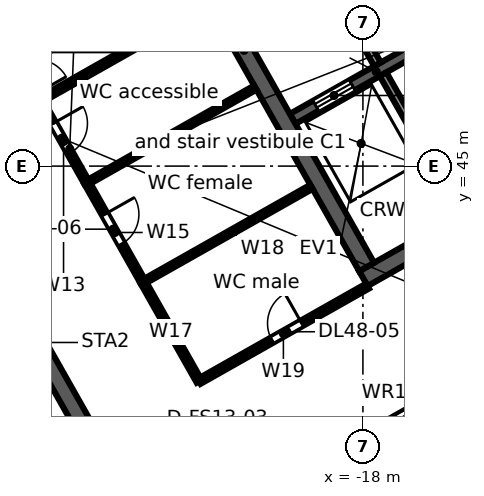
"""IFC4 building model, lengths in metres.
Left out: names, types, materials, properties, quantities, classifications, styles, units other than length and angle.
Written with IfcOpenShell. Run it as: python <this file> out.ifc"""

import sys

from ifc_helpers import new_model, si_unit, direction, frame, frame_2d, origin, place, context, subcontext, project, spatial, rectangle, extrude, element, fill, save


model = new_model("IFC4")
c1 = context("Model", 3, precision=1e-05, world=origin(), true_north=direction((0.0, 1.0)))
c2 = subcontext(c1, "Body", "Model", "MODEL_VIEW")
j1 = project(units=[si_unit("LENGTHUNIT", "METRE"), si_unit("PLANEANGLEUNIT", "RADIAN")], contexts=[c1])
p1 = place(None, origin())
s1 = spatial("IfcSite", under=j1, at=p1, CompositionType="ELEMENT")
p2 = place(p1, origin())
s2 = spatial("IfcBuilding", under=s1, at=p2, CompositionType="ELEMENT")
p3 = place(p2, frame((0.0, 0.0, 227.0)))
s3 = spatial("IfcBuildingStorey", under=s2, at=p3, CompositionType="ELEMENT", Elevation=227.0)
p4 = place(p3, frame((-0.046, 47.974, 0.0), z_axis=(0.0, 0.0, 1.0), x_axis=(-0.870356579543, -0.492421998337, 0.0)))
e1 = element("IfcWall", 1, at=p4, inside=s3, PredefinedType="STANDARD", context=c2, shape_type="SweptSolid", body=[
    extrude(rectangle(XDim=43.754, YDim=0.25, at=frame_2d((21.877, 0.0))), origin(), (0.0, 0.0, 1.0), 3.55),
])
p5 = place(p4, frame((41.061, 0.0, 0.8)))
e2 = element("IfcOpeningElement", 2, at=p5, cuts=e1, PredefinedType="OPENING", context=c2, shape_type="SweptSolid", body=[
    extrude(rectangle(XDim=2.4, YDim=2.2, at=frame_2d((1.2, 1.1))), frame((0.0, 0.135, 0.0), z_axis=(0.0, -1.0, 0.0), x_axis=(1.0, 0.0, 0.0)), (0.0, 0.0, 1.0), 0.27),
])
p6 = place(p4, frame((38.443, 0.0, 0.0)))
e3 = element("IfcOpeningElement", 3, at=p6, cuts=e1, PredefinedType="OPENING", context=c2, shape_type="SweptSolid", body=[
    extrude(rectangle(XDim=1.8, YDim=2.4, at=frame_2d((0.9, 1.2))), frame((0.0, 0.135, 0.0), z_axis=(0.0, -1.0, 0.0), x_axis=(1.0, 0.0, 0.0)), (0.0, 0.0, 1.0), 0.27),
])
p7 = place(p4, frame((35.225, 0.0, 0.8)))
e4 = element("IfcOpeningElement", 4, at=p7, cuts=e1, PredefinedType="OPENING", context=c2, shape_type="SweptSolid", body=[
    extrude(rectangle(XDim=2.4, YDim=2.2, at=frame_2d((1.2, 1.1))), frame((0.0, 0.135, 0.0), z_axis=(0.0, -1.0, 0.0), x_axis=(1.0, 0.0, 0.0)), (0.0, 0.0, 1.0), 0.27),
])
p8 = place(p4, frame((32.307, 0.0, 0.8)))
e5 = element("IfcOpeningElement", 5, at=p8, cuts=e1, PredefinedType="OPENING", context=c2, shape_type="SweptSolid", body=[
    extrude(rectangle(XDim=2.4, YDim=2.2, at=frame_2d((1.2, 1.1))), frame((0.0, 0.135, 0.0), z_axis=(0.0, -1.0, 0.0), x_axis=(1.0, 0.0, 0.0)), (0.0, 0.0, 1.0), 0.27),
])
p9 = place(p4, frame((29.688, 0.0, 0.0)))
e6 = element("IfcOpeningElement", 6, at=p9, cuts=e1, PredefinedType="OPENING", context=c2, shape_type="SweptSolid", body=[
    extrude(rectangle(XDim=1.8, YDim=2.4, at=frame_2d((0.9, 1.2))), frame((0.0, 0.135, 0.0), z_axis=(0.0, -1.0, 0.0), x_axis=(1.0, 0.0, 0.0)), (0.0, 0.0, 1.0), 0.27),
])
p10 = place(p4, frame((26.47, 0.0, 0.8)))
e7 = element("IfcOpeningElement", 7, at=p10, cuts=e1, PredefinedType="OPENING", context=c2, shape_type="SweptSolid", body=[
    extrude(rectangle(XDim=2.4, YDim=2.2, at=frame_2d((1.2, 1.1))), frame((0.0, 0.135, 0.0), z_axis=(0.0, -1.0, 0.0), x_axis=(1.0, 0.0, 0.0)), (0.0, 0.0, 1.0), 0.27),
])
p11 = place(p4, frame((23.552, 0.0, 0.8)))
e8 = element("IfcOpeningElement", 8, at=p11, cuts=e1, PredefinedType="OPENING", context=c2, shape_type="SweptSolid", body=[
    extrude(rectangle(XDim=2.4, YDim=2.2, at=frame_2d((1.2, 1.1))), frame((0.0, 0.135, 0.0), z_axis=(0.0, -1.0, 0.0), x_axis=(1.0, 0.0, 0.0)), (0.0, 0.0, 1.0), 0.27),
])
p12 = place(p4, frame((20.934, 0.0, 0.0)))
e9 = element("IfcOpeningElement", 9, at=p12, cuts=e1, PredefinedType="OPENING", context=c2, shape_type="SweptSolid", body=[
    extrude(rectangle(XDim=1.8, YDim=2.4, at=frame_2d((0.9, 1.2))), frame((0.0, 0.135, 0.0), z_axis=(0.0, -1.0, 0.0), x_axis=(1.0, 0.0, 0.0)), (0.0, 0.0, 1.0), 0.27),
])
p13 = place(p4, frame((17.716, 0.0, 0.8)))
e10 = element("IfcOpeningElement", 10, at=p13, cuts=e1, PredefinedType="OPENING", context=c2, shape_type="SweptSolid", body=[
    extrude(rectangle(XDim=2.4, YDim=2.2, at=frame_2d((1.2, 1.1))), frame((0.0, 0.135, 0.0), z_axis=(0.0, -1.0, 0.0), x_axis=(1.0, 0.0, 0.0)), (0.0, 0.0, 1.0), 0.27),
])
p14 = place(p4, frame((14.798, 0.0, 0.8)))
e11 = element("IfcOpeningElement", 11, at=p14, cuts=e1, PredefinedType="OPENING", context=c2, shape_type="SweptSolid", body=[
    extrude(rectangle(XDim=2.4, YDim=2.2, at=frame_2d((1.2, 1.1))), frame((0.0, 0.135, 0.0), z_axis=(0.0, -1.0, 0.0), x_axis=(1.0, 0.0, 0.0)), (0.0, 0.0, 1.0), 0.27),
])
p15 = place(p4, frame((12.179, 0.0, 0.0)))
e12 = element("IfcOpeningElement", 12, at=p15, cuts=e1, PredefinedType="OPENING", context=c2, shape_type="SweptSolid", body=[
    extrude(rectangle(XDim=1.8, YDim=2.4, at=frame_2d((0.9, 1.2))), frame((0.0, 0.135, 0.0), z_axis=(0.0, -1.0, 0.0), x_axis=(1.0, 0.0, 0.0)), (0.0, 0.0, 1.0), 0.27),
])
p16 = place(p4, frame((8.961, 0.0, 0.8)))
e13 = element("IfcOpeningElement", 13, at=p16, cuts=e1, PredefinedType="OPENING", context=c2, shape_type="SweptSolid", body=[
    extrude(rectangle(XDim=2.4, YDim=2.2, at=frame_2d((1.2, 1.1))), frame((0.0, 0.135, 0.0), z_axis=(0.0, -1.0, 0.0), x_axis=(1.0, 0.0, 0.0)), (0.0, 0.0, 1.0), 0.27),
])
p17 = place(p4, frame((6.043, 0.0, 0.8)))
e14 = element("IfcOpeningElement", 14, at=p17, cuts=e1, PredefinedType="OPENING", context=c2, shape_type="SweptSolid", body=[
    extrude(rectangle(XDim=2.4, YDim=2.2, at=frame_2d((1.2, 1.1))), frame((0.0, 0.135, 0.0), z_axis=(0.0, -1.0, 0.0), x_axis=(1.0, 0.0, 0.0)), (0.0, 0.0, 1.0), 0.27),
])
p18 = place(p4, frame((3.425, 0.0, 0.0)))
e15 = element("IfcOpeningElement", 15, at=p18, cuts=e1, PredefinedType="OPENING", context=c2, shape_type="SweptSolid", body=[
    extrude(rectangle(XDim=1.8, YDim=2.4, at=frame_2d((0.9, 1.2))), frame((0.0, 0.135, 0.0), z_axis=(0.0, -1.0, 0.0), x_axis=(1.0, 0.0, 0.0)), (0.0, 0.0, 1.0), 0.27),
])
p19 = place(p4, frame((0.207, 0.0, 0.8)))
e16 = element("IfcOpeningElement", 16, at=p19, cuts=e1, PredefinedType="OPENING", context=c2, shape_type="SweptSolid", body=[
    extrude(rectangle(XDim=2.4, YDim=2.2, at=frame_2d((1.2, 1.1))), frame((0.0, 0.135, 0.0), z_axis=(0.0, -1.0, 0.0), x_axis=(1.0, 0.0, 0.0)), (0.0, 0.0, 1.0), 0.27),
])
p20 = place(p3, frame((-58.732, 38.771, 0.0), z_axis=(0.0, 0.0, 1.0), x_axis=(0.870354824205, 0.492425100887, 0.0)))
e17 = element("IfcWall", 17, at=p20, inside=s3, PredefinedType="STANDARD", context=c2, shape_type="SweptSolid", body=[
    extrude(rectangle(XDim=64.006, YDim=0.25, at=frame_2d((32.003, 0.0))), origin(), (0.0, 0.0, 1.0), 3.55),
])
p21 = place(p20, frame((61.259, 0.0, 0.8)))
e18 = element("IfcOpeningElement", 18, at=p21, cuts=e17, PredefinedType="OPENING", context=c2, shape_type="SweptSolid", body=[
    extrude(rectangle(XDim=2.4, YDim=2.2, at=frame_2d((1.2, 1.1))), frame((0.0, 0.135, 0.0), z_axis=(0.0, -1.0, 0.0), x_axis=(1.0, 0.0, 0.0)), (0.0, 0.0, 1.0), 0.27),
])
p22 = place(p20, frame((58.216, 0.0, 0.8)))
e19 = element("IfcOpeningElement", 19, at=p22, cuts=e17, PredefinedType="OPENING", context=c2, shape_type="SweptSolid", body=[
    extrude(rectangle(XDim=2.4, YDim=2.2, at=frame_2d((1.2, 1.1))), frame((0.0, 0.135, 0.0), z_axis=(0.0, -1.0, 0.0), x_axis=(1.0, 0.0, 0.0)), (0.0, 0.0, 1.0), 0.27),
])
p23 = place(p20, frame((55.173, 0.0, 0.8)))
e20 = element("IfcOpeningElement", 20, at=p23, cuts=e17, PredefinedType="OPENING", context=c2, shape_type="SweptSolid", body=[
    extrude(rectangle(XDim=2.4, YDim=2.2, at=frame_2d((1.2, 1.1))), frame((0.0, 0.135, 0.0), z_axis=(0.0, -1.0, 0.0), x_axis=(1.0, 0.0, 0.0)), (0.0, 0.0, 1.0), 0.27),
])
p24 = place(p20, frame((52.129, 0.0, 0.8)))
e21 = element("IfcOpeningElement", 21, at=p24, cuts=e17, PredefinedType="OPENING", context=c2, shape_type="SweptSolid", body=[
    extrude(rectangle(XDim=2.4, YDim=2.2, at=frame_2d((1.2, 1.1))), frame((0.0, 0.135, 0.0), z_axis=(0.0, -1.0, 0.0), x_axis=(1.0, 0.0, 0.0)), (0.0, 0.0, 1.0), 0.27),
])
p25 = place(p20, frame((49.086, 0.0, 0.8)))
e22 = element("IfcOpeningElement", 22, at=p25, cuts=e17, PredefinedType="OPENING", context=c2, shape_type="SweptSolid", body=[
    extrude(rectangle(XDim=2.4, YDim=2.2, at=frame_2d((1.2, 1.1))), frame((0.0, 0.135, 0.0), z_axis=(0.0, -1.0, 0.0), x_axis=(1.0, 0.0, 0.0)), (0.0, 0.0, 1.0), 0.27),
])
p26 = place(p20, frame((46.043, 0.0, 0.8)))
e23 = element("IfcOpeningElement", 23, at=p26, cuts=e17, PredefinedType="OPENING", context=c2, shape_type="SweptSolid", body=[
    extrude(rectangle(XDim=2.4, YDim=2.2, at=frame_2d((1.2, 1.1))), frame((0.0, 0.135, 0.0), z_axis=(0.0, -1.0, 0.0), x_axis=(1.0, 0.0, 0.0)), (0.0, 0.0, 1.0), 0.27),
])
p27 = place(p20, frame((43.0, 0.0, 0.8)))
e24 = element("IfcOpeningElement", 24, at=p27, cuts=e17, PredefinedType="OPENING", context=c2, shape_type="SweptSolid", body=[
    extrude(rectangle(XDim=2.4, YDim=2.2, at=frame_2d((1.2, 1.1))), frame((0.0, 0.135, 0.0), z_axis=(0.0, -1.0, 0.0), x_axis=(1.0, 0.0, 0.0)), (0.0, 0.0, 1.0), 0.27),
])
p28 = place(p20, frame((39.956, 0.0, 0.8)))
e25 = element("IfcOpeningElement", 25, at=p28, cuts=e17, PredefinedType="OPENING", context=c2, shape_type="SweptSolid", body=[
    extrude(rectangle(XDim=2.4, YDim=2.2, at=frame_2d((1.2, 1.1))), frame((0.0, 0.135, 0.0), z_axis=(0.0, -1.0, 0.0), x_axis=(1.0, 0.0, 0.0)), (0.0, 0.0, 1.0), 0.27),
])
p29 = place(p20, frame((36.913, 0.0, 0.8)))
e26 = element("IfcOpeningElement", 26, at=p29, cuts=e17, PredefinedType="OPENING", context=c2, shape_type="SweptSolid", body=[
    extrude(rectangle(XDim=2.4, YDim=2.2, at=frame_2d((1.2, 1.1))), frame((0.0, 0.135, 0.0), z_axis=(0.0, -1.0, 0.0), x_axis=(1.0, 0.0, 0.0)), (0.0, 0.0, 1.0), 0.27),
])
p30 = place(p20, frame((33.87, 0.0, 0.8)))
e27 = element("IfcOpeningElement", 27, at=p30, cuts=e17, PredefinedType="OPENING", context=c2, shape_type="SweptSolid", body=[
    extrude(rectangle(XDim=2.4, YDim=2.2, at=frame_2d((1.2, 1.1))), frame((0.0, 0.135, 0.0), z_axis=(0.0, -1.0, 0.0), x_axis=(1.0, 0.0, 0.0)), (0.0, 0.0, 1.0), 0.27),
])
p31 = place(p20, frame((30.826, 0.0, 0.8)))
e28 = element("IfcOpeningElement", 28, at=p31, cuts=e17, PredefinedType="OPENING", context=c2, shape_type="SweptSolid", body=[
    extrude(rectangle(XDim=2.4, YDim=2.2, at=frame_2d((1.2, 1.1))), frame((0.0, 0.135, 0.0), z_axis=(0.0, -1.0, 0.0), x_axis=(1.0, 0.0, 0.0)), (0.0, 0.0, 1.0), 0.27),
])
p32 = place(p20, frame((27.783, 0.0, 0.8)))
e29 = element("IfcOpeningElement", 29, at=p32, cuts=e17, PredefinedType="OPENING", context=c2, shape_type="SweptSolid", body=[
    extrude(rectangle(XDim=2.4, YDim=2.2, at=frame_2d((1.2, 1.1))), frame((0.0, 0.135, 0.0), z_axis=(0.0, -1.0, 0.0), x_axis=(1.0, 0.0, 0.0)), (0.0, 0.0, 1.0), 0.27),
])
p33 = place(p20, frame((24.74, 0.0, 0.8)))
e30 = element("IfcOpeningElement", 30, at=p33, cuts=e17, PredefinedType="OPENING", context=c2, shape_type="SweptSolid", body=[
    extrude(rectangle(XDim=2.4, YDim=2.2, at=frame_2d((1.2, 1.1))), frame((0.0, 0.135, 0.0), z_axis=(0.0, -1.0, 0.0), x_axis=(1.0, 0.0, 0.0)), (0.0, 0.0, 1.0), 0.27),
])
p34 = place(p20, frame((21.696, 0.0, 0.8)))
e31 = element("IfcOpeningElement", 31, at=p34, cuts=e17, PredefinedType="OPENING", context=c2, shape_type="SweptSolid", body=[
    extrude(rectangle(XDim=2.4, YDim=2.2, at=frame_2d((1.2, 1.1))), frame((0.0, 0.135, 0.0), z_axis=(0.0, -1.0, 0.0), x_axis=(1.0, 0.0, 0.0)), (0.0, 0.0, 1.0), 0.27),
])
p35 = place(p20, frame((18.653, 0.0, 0.8)))
e32 = element("IfcOpeningElement", 32, at=p35, cuts=e17, PredefinedType="OPENING", context=c2, shape_type="SweptSolid", body=[
    extrude(rectangle(XDim=2.4, YDim=2.2, at=frame_2d((1.2, 1.1))), frame((0.0, 0.135, 0.0), z_axis=(0.0, -1.0, 0.0), x_axis=(1.0, 0.0, 0.0)), (0.0, 0.0, 1.0), 0.27),
])
p36 = place(p20, frame((15.61, 0.0, 0.8)))
e33 = element("IfcOpeningElement", 33, at=p36, cuts=e17, PredefinedType="OPENING", context=c2, shape_type="SweptSolid", body=[
    extrude(rectangle(XDim=2.4, YDim=2.2, at=frame_2d((1.2, 1.1))), frame((0.0, 0.135, 0.0), z_axis=(0.0, -1.0, 0.0), x_axis=(1.0, 0.0, 0.0)), (0.0, 0.0, 1.0), 0.27),
])
p37 = place(p20, frame((12.567, 0.0, 0.8)))
e34 = element("IfcOpeningElement", 34, at=p37, cuts=e17, PredefinedType="OPENING", context=c2, shape_type="SweptSolid", body=[
    extrude(rectangle(XDim=2.4, YDim=2.2, at=frame_2d((1.2, 1.1))), frame((0.0, 0.135, 0.0), z_axis=(0.0, -1.0, 0.0), x_axis=(1.0, 0.0, 0.0)), (0.0, 0.0, 1.0), 0.27),
])
p38 = place(p20, frame((9.523, 0.0, 0.8)))
e35 = element("IfcOpeningElement", 35, at=p38, cuts=e17, PredefinedType="OPENING", context=c2, shape_type="SweptSolid", body=[
    extrude(rectangle(XDim=2.4, YDim=2.2, at=frame_2d((1.2, 1.1))), frame((0.0, 0.135, 0.0), z_axis=(0.0, -1.0, 0.0), x_axis=(1.0, 0.0, 0.0)), (0.0, 0.0, 1.0), 0.27),
])
p39 = place(p20, frame((6.48, 0.0, 0.8)))
e36 = element("IfcOpeningElement", 36, at=p39, cuts=e17, PredefinedType="OPENING", context=c2, shape_type="SweptSolid", body=[
    extrude(rectangle(XDim=2.4, YDim=2.2, at=frame_2d((1.2, 1.1))), frame((0.0, 0.135, 0.0), z_axis=(0.0, -1.0, 0.0), x_axis=(1.0, 0.0, 0.0)), (0.0, 0.0, 1.0), 0.27),
])
p40 = place(p20, frame((3.437, 0.0, 0.8)))
e37 = element("IfcOpeningElement", 37, at=p40, cuts=e17, PredefinedType="OPENING", context=c2, shape_type="SweptSolid", body=[
    extrude(rectangle(XDim=2.4, YDim=2.2, at=frame_2d((1.2, 1.1))), frame((0.0, 0.135, 0.0), z_axis=(0.0, -1.0, 0.0), x_axis=(1.0, 0.0, 0.0)), (0.0, 0.0, 1.0), 0.27),
])
p41 = place(p20, frame((0.393, 0.0, 0.8)))
e38 = element("IfcOpeningElement", 38, at=p41, cuts=e17, PredefinedType="OPENING", context=c2, shape_type="SweptSolid", body=[
    extrude(rectangle(XDim=2.4, YDim=2.2, at=frame_2d((1.2, 1.1))), frame((0.0, 0.135, 0.0), z_axis=(0.0, -1.0, 0.0), x_axis=(1.0, 0.0, 0.0)), (0.0, 0.0, 1.0), 0.27),
])
p42 = place(p3, frame((-31.787, 49.542, 0.0), z_axis=(0.0, 0.0, 1.0), x_axis=(0.492421378713, -0.870356930107, 0.0)))
e39 = element("IfcWall", 39, at=p42, inside=s3, PredefinedType="SOLIDWALL", context=c2, shape_type="SweptSolid", body=[
    extrude(rectangle(XDim=13.1, YDim=0.45, at=frame_2d((6.55, 0.0))), origin(), (0.0, 0.0, 1.0), 3.55),
])
p43 = place(p3, frame((-17.988, 42.039, 0.0), z_axis=(0.0, 0.0, 1.0), x_axis=(0.870360574057, 0.492414937962, 0.0)))
e40 = element("IfcWall", 40, at=p43, inside=s3, PredefinedType="SOLIDWALL", context=c2, shape_type="SweptSolid", body=[
    extrude(rectangle(XDim=15.0, YDim=0.45, at=frame_2d((7.5, 0.0))), origin(), (0.0, 0.0, 1.0), 3.55),
])
p44 = place(p43, frame((6.1, 0.0, 0.0)))
e41 = element("IfcOpeningElement", 41, at=p44, cuts=e40, PredefinedType="OPENING", context=c2, shape_type="SweptSolid", body=[
    extrude(rectangle(XDim=1.2, YDim=2.1, at=frame_2d((0.6, 1.05))), frame((0.0, 0.235, 0.0), z_axis=(0.0, -1.0, 0.0), x_axis=(1.0, 0.0, 0.0)), (0.0, 0.0, 1.0), 0.47),
])
p45 = place(p3, frame((-19.849, 46.242, 0.0), z_axis=(0.0, 0.0, 1.0), x_axis=(0.870347559728, 0.492437940532, 0.0)))
e42 = element("IfcWall", 42, at=p45, inside=s3, PredefinedType="SOLIDWALL", context=c2, shape_type="SweptSolid", body=[
    extrude(rectangle(XDim=5.05, YDim=0.3, at=frame_2d((2.525, 0.0))), origin(), (0.0, 0.0, 1.0), 3.55),
])
p46 = place(p45, frame((0.7, 0.0, 0.0)))
e43 = element("IfcOpeningElement", 43, at=p46, cuts=e42, PredefinedType="OPENING", context=c2, shape_type="SweptSolid", body=[
    extrude(rectangle(XDim=1.1, YDim=2.1, at=frame_2d((0.55, 1.05))), frame((0.0, 0.16, 0.0), z_axis=(0.0, -1.0, 0.0), x_axis=(1.0, 0.0, 0.0)), (0.0, 0.0, 1.0), 0.32),
])
p47 = place(p45, frame((3.8, 0.0, 0.0)))
e44 = element("IfcOpeningElement", 44, at=p47, cuts=e42, PredefinedType="OPENING", context=c2, shape_type="SweptSolid", body=[
    extrude(rectangle(XDim=0.9, YDim=2.1, at=frame_2d((0.45, 1.05))), frame((0.0, 0.16, 0.0), z_axis=(0.0, -1.0, 0.0), x_axis=(1.0, 0.0, 0.0)), (0.0, 0.0, 1.0), 0.32),
])
p48 = place(p3, frame((-24.353, 53.747, 0.0), z_axis=(0.0, 0.0, 1.0), x_axis=(0.492435496286, -0.870348942665, 0.0)))
e45 = element("IfcWall", 45, at=p48, inside=s3, PredefinedType="SOLIDWALL", context=c2, shape_type="SweptSolid", body=[
    extrude(rectangle(XDim=13.1, YDim=0.45, at=frame_2d((6.55, 0.0))), origin(), (0.0, 0.0, 1.0), 3.55),
])
p49 = place(p3, frame((-17.469, 47.417, 0.0), z_axis=(0.0, 0.0, 1.0), x_axis=(0.492453686477, -0.870338650569, 0.0)))
e46 = element("IfcWall", 46, at=p49, inside=s3, PredefinedType="SOLIDWALL", context=c2, shape_type="SweptSolid", body=[
    extrude(rectangle(XDim=4.2, YDim=0.2, at=frame_2d((2.1, 0.0))), origin(), (0.0, 0.0, 1.0), 3.55),
])
p50 = place(p3, frame((-19.635, 51.246, 0.0), z_axis=(0.0, 0.0, 1.0), x_axis=(0.492408451753, -0.87036424366, 0.0)))
e47 = element("IfcWall", 47, at=p50, inside=s3, PredefinedType="PARTITIONING", context=c2, shape_type="SweptSolid", body=[
    extrude(rectangle(XDim=4.1, YDim=0.2, at=frame_2d((2.05, 0.0))), origin(), (0.0, 0.0, 1.0), 3.55),
])
p51 = place(p50, frame((1.55, 0.0, 0.0)))
e48 = element("IfcOpeningElement", 48, at=p51, cuts=e47, PredefinedType="OPENING", context=c2, shape_type="SweptSolid", body=[
    extrude(rectangle(XDim=1.0, YDim=2.1, at=frame_2d((0.5, 1.05))), frame((0.0, 0.11, 0.0), z_axis=(0.0, -1.0, 0.0), x_axis=(1.0, 0.0, 0.0)), (0.0, 0.0, 1.0), 0.22),
])
p52 = place(p3, frame((-27.232, 48.04, 0.0), z_axis=(0.0, 0.0, 1.0), x_axis=(0.870339461844, 0.492452252668, 0.0)))
e49 = element("IfcWall", 49, at=p52, inside=s3, PredefinedType="PARTITIONING", context=c2, shape_type="SweptSolid", body=[
    extrude(rectangle(XDim=5.091, YDim=0.125, at=frame_2d((2.545, 0.0))), origin(), (0.0, 0.0, 1.0), 2.722),
])
p53 = place(p3, frame((-26.493, 46.734, 0.0), z_axis=(0.0, 0.0, 1.0), x_axis=(0.49257867544, -0.870267917656, 0.0)))
e50 = element("IfcWall", 50, at=p53, inside=s3, PredefinedType="PARTITIONING", context=c2, shape_type="SweptSolid", body=[
    extrude(rectangle(XDim=2.499, YDim=0.15, at=frame_2d((1.25, 0.0))), origin(), (0.0, 0.0, 1.0), 2.722),
])
p54 = place(p53, frame((0.7, 0.0, 0.0)))
e51 = element("IfcOpeningElement", 51, at=p54, cuts=e50, PredefinedType="OPENING", context=c2, shape_type="SweptSolid", body=[
    extrude(rectangle(XDim=0.9, YDim=2.1, at=frame_2d((0.45, 1.05))), frame((0.0, 0.085, 0.0), z_axis=(0.0, -1.0, 0.0), x_axis=(1.0, 0.0, 0.0)), (0.0, 0.0, 1.0), 0.17),
])
p55 = place(p3, frame((-26.493, 46.734, 0.0), z_axis=(0.0, 0.0, 1.0), x_axis=(0.870339461844, 0.492452252668, 0.0)))
e52 = element("IfcWall", 52, at=p55, inside=s3, PredefinedType="PARTITIONING", context=c2, shape_type="SweptSolid", body=[
    extrude(rectangle(XDim=5.091, YDim=0.15, at=frame_2d((2.545, 0.0))), origin(), (0.0, 0.0, 1.0), 2.722),
])
p56 = place(p3, frame((-25.262, 44.559, 0.0), z_axis=(0.0, 0.0, 1.0), x_axis=(0.492226144536, -0.870467358742, 0.0)))
e53 = element("IfcWall", 53, at=p56, inside=s3, PredefinedType="PARTITIONING", context=c2, shape_type="SweptSolid", body=[
    extrude(rectangle(XDim=3.001, YDim=0.15, at=frame_2d((1.5, 0.0))), origin(), (0.0, 0.0, 1.0), 3.55),
])
p57 = place(p56, frame((0.95, 0.0, 0.0)))
e54 = element("IfcOpeningElement", 54, at=p57, cuts=e53, PredefinedType="OPENING", context=c2, shape_type="SweptSolid", body=[
    extrude(rectangle(XDim=0.9, YDim=2.1, at=frame_2d((0.45, 1.05))), frame((0.0, 0.085, 0.0), z_axis=(0.0, -1.0, 0.0), x_axis=(1.0, 0.0, 0.0)), (0.0, 0.0, 1.0), 0.17),
])
p58 = place(p3, frame((-25.262, 44.559, 0.0), z_axis=(0.0, 0.0, 1.0), x_axis=(0.870442223229, 0.492270592276, 0.0)))
e55 = element("IfcWall", 55, at=p58, inside=s3, PredefinedType="PARTITIONING", context=c2, shape_type="SweptSolid", body=[
    extrude(rectangle(XDim=5.09, YDim=0.125, at=frame_2d((2.545, 0.0))), origin(), (0.0, 0.0, 1.0), 3.55),
])
p59 = place(p3, frame((-23.785, 41.947, 0.0), z_axis=(0.0, 0.0, 1.0), x_axis=(0.492303960105, -0.870423351516, 0.0)))
e56 = element("IfcWall", 56, at=p59, inside=s3, PredefinedType="PARTITIONING", context=c2, shape_type="SweptSolid", body=[
    extrude(rectangle(XDim=3.0, YDim=0.15, at=frame_2d((1.5, 0.0))), origin(), (0.0, 0.0, 1.0), 3.55),
])
p60 = place(p3, frame((-23.785, 41.947, 0.0), z_axis=(0.0, 0.0, 1.0), x_axis=(0.870339461844, 0.492452252668, 0.0)))
e57 = element("IfcWall", 57, at=p60, inside=s3, PredefinedType="PARTITIONING", context=c2, shape_type="SweptSolid", body=[
    extrude(rectangle(XDim=5.091, YDim=0.125, at=frame_2d((2.545, 0.0))), origin(), (0.0, 0.0, 1.0), 3.55),
])
p61 = place(p3, frame((-22.308, 39.336, 0.0), z_axis=(0.0, 0.0, 1.0), x_axis=(0.870351090701, 0.492431699747, 0.0)))
e58 = element("IfcWall", 58, at=p61, inside=s3, PredefinedType="PARTITIONING", context=c2, shape_type="SweptSolid", body=[
    extrude(rectangle(XDim=5.091, YDim=0.15, at=frame_2d((2.546, 0.0))), origin(), (0.0, 0.0, 1.0), 3.55),
])
p62 = place(p61, frame((2.2, 0.0, 0.0)))
e59 = element("IfcOpeningElement", 59, at=p62, cuts=e58, PredefinedType="OPENING", context=c2, shape_type="SweptSolid", body=[
    extrude(rectangle(XDim=0.9, YDim=2.1, at=frame_2d((0.45, 1.05))), frame((0.0, 0.085, 0.0), z_axis=(0.0, -1.0, 0.0), x_axis=(1.0, 0.0, 0.0)), (0.0, 0.0, 1.0), 0.17),
])
p63 = place(p13, origin())
e60 = element("IfcWindow", 60, at=p63, inside=s3, PartitioningType="SINGLE_PANEL", PredefinedType="WINDOW", context=c2, shape_type="SweptSolid", body=[
    extrude(rectangle(XDim=2.4, YDim=2.2, at=frame_2d((1.2, 1.1))), frame((0.0, 0.03, 0.0), z_axis=(0.0, -1.0, 0.0), x_axis=(1.0, 0.0, 0.0)), (0.0, 0.0, 1.0), 0.06),
])
fill(e10, e60)
p64 = place(p46, origin())
e61 = element("IfcDoor", 61, at=p64, inside=s3, OperationType="DOUBLE_DOOR_SLIDING", PredefinedType="DOOR", context=c2, shape_type="SweptSolid", body=[
    extrude(rectangle(XDim=1.1, YDim=2.1, at=frame_2d((0.55, 1.05))), frame((0.0, 0.025, 0.0), z_axis=(0.0, -1.0, 0.0), x_axis=(1.0, 0.0, 0.0)), (0.0, 0.0, 1.0), 0.05),
])
fill(e43, e61)
p65 = place(p62, origin())
e62 = element("IfcDoor", 62, at=p65, inside=s3, OperationType="SINGLE_SWING_RIGHT", PredefinedType="DOOR", context=c2, shape_type="SweptSolid", body=[
    extrude(rectangle(XDim=0.9, YDim=2.1, at=frame_2d((0.45, 1.05))), frame((0.0, 0.025, 0.0), z_axis=(0.0, -1.0, 0.0), x_axis=(1.0, 0.0, 0.0)), (0.0, 0.0, 1.0), 0.05),
])
fill(e59, e62)
p66 = place(p57, origin())
e63 = element("IfcDoor", 63, at=p66, inside=s3, OperationType="SINGLE_SWING_LEFT", PredefinedType="DOOR", context=c2, shape_type="SweptSolid", body=[
    extrude(rectangle(XDim=0.9, YDim=2.1, at=frame_2d((0.45, 1.05))), frame((0.0, 0.025, 0.0), z_axis=(0.0, -1.0, 0.0), x_axis=(1.0, 0.0, 0.0)), (0.0, 0.0, 1.0), 0.05),
])
fill(e54, e63)
p67 = place(p54, origin())
e64 = element("IfcDoor", 64, at=p67, inside=s3, OperationType="SINGLE_SWING_LEFT", PredefinedType="DOOR", context=c2, shape_type="SweptSolid", body=[
    extrude(rectangle(XDim=0.9, YDim=2.1, at=frame_2d((0.45, 1.05))), frame((0.0, 0.025, 0.0), z_axis=(0.0, -1.0, 0.0), x_axis=(1.0, 0.0, 0.0)), (0.0, 0.0, 1.0), 0.05),
])
fill(e51, e64)
save(model, sys.argv[1])
